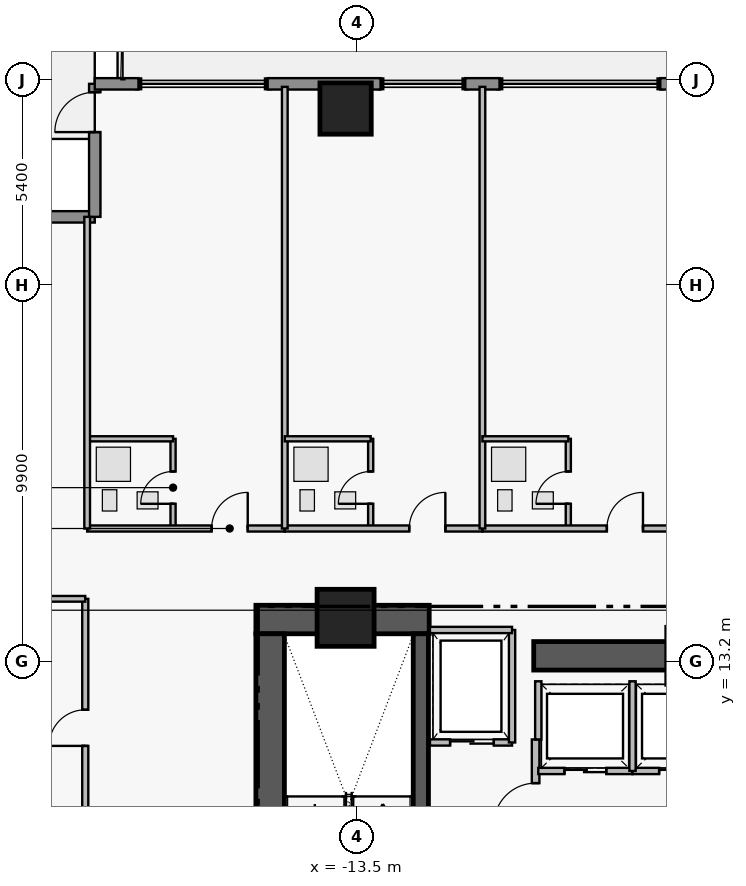
"""IFC4 building model, lengths in metres.
Left out: names, types, materials, properties, quantities, classifications, styles, units other than length and angle.
Written with IfcOpenShell. Run it as: python <this file> out.ifc"""

import sys

from ifc_helpers import new_model, si_unit, direction, frame, frame_2d, origin, origin_2d, place, context, subcontext, project, spatial, rectangle, extrude, element, fill, save


model = new_model("IFC4")
c1 = context("Model", 3, precision=1e-05, world=origin(), true_north=direction((0.0, 1.0)))
c2 = subcontext(c1, "Body", "Model", "MODEL_VIEW")
j1 = project(units=[si_unit("LENGTHUNIT", "METRE"), si_unit("PLANEANGLEUNIT", "RADIAN")], contexts=[c1])
p1 = place(None, origin())
s1 = spatial("IfcSite", under=j1, at=p1, CompositionType="ELEMENT")
p2 = place(p1, origin())
s2 = spatial("IfcBuilding", under=s1, at=p2, CompositionType="ELEMENT")
p3 = place(p2, frame((0.0, 0.0, 150.4)))
s3 = spatial("IfcBuildingStorey", under=s2, at=p3, CompositionType="ELEMENT", Elevation=150.4)
p4 = place(p3, frame((-16.16, 14.305, 0.0), z_axis=(0.0, 0.0, 1.0), x_axis=(1.0, 0.0, 0.0)))
e1 = element("IfcWall", 1, at=p4, inside=s3, PredefinedType="SHEAR", context=c2, shape_type="SweptSolid", body=[
    extrude(rectangle(XDim=4.56, YDim=0.75, at=frame_2d((2.28, 0.0))), origin(), (0.0, 0.0, 1.0), 3.46),
])
p5 = place(p3, frame((-15.785, 4.97, 0.0), z_axis=(0.0, 0.0, 1.0), x_axis=(0.0, 1.0, 0.0)))
e2 = element("IfcWall", 2, at=p5, inside=s3, PredefinedType="SHEAR", context=c2, shape_type="SweptSolid", body=[
    extrude(rectangle(XDim=8.96, YDim=0.75, at=frame_2d((4.48, 0.0))), origin(), (0.0, 0.0, 1.0), 3.46),
])
p6 = place(p3, frame((-8.85, 13.35, 0.0), z_axis=(0.0, 0.0, 1.0), x_axis=(1.0, 0.0, 0.0)))
e3 = element("IfcWall", 3, at=p6, inside=s3, PredefinedType="SHEAR", context=c2, shape_type="SweptSolid", body=[
    extrude(rectangle(XDim=7.6, YDim=0.75, at=frame_2d((3.8, 0.0))), origin(), (0.0, 0.0, 1.0), 3.43),
])
p7 = place(p3, frame((-11.82, 4.97, 0.0), z_axis=(0.0, 0.0, 1.0), x_axis=(0.0, 1.0, 0.0)))
e4 = element("IfcWall", 4, at=p7, inside=s3, PredefinedType="SHEAR", context=c2, shape_type="SweptSolid", body=[
    extrude(rectangle(XDim=8.96, YDim=0.4, at=frame_2d((4.48, 0.0))), origin(), (0.0, 0.0, 1.0), 3.46),
])
p8 = place(p7, frame((0.31, 0.0, 0.0)))
e5 = element("IfcOpeningElement", 5, at=p8, cuts=e4, PredefinedType="OPENING", context=c2, shape_type="SweptSolid", body=[
    extrude(rectangle(XDim=1.12, YDim=2.22, at=frame_2d((0.56, 1.11))), frame((0.0, 0.21, 0.0), z_axis=(0.0, -1.0, 0.0), x_axis=(1.0, 0.0, 0.0)), (0.0, 0.0, 1.0), 0.42),
])
p9 = place(p3, frame((-13.8, 14.35, 0.0), z_axis=(0.0, 0.0, 1.0), x_axis=(1.0, 0.0, 0.0)))
e6 = element("IfcColumn", 6, at=p9, inside=s3, PredefinedType="COLUMN", context=c2, shape_type="SweptSolid", body=[
    extrude(rectangle(XDim=1.5, YDim=1.5, at=origin_2d()), origin(), (0.0, 0.0, 1.0), 3.65),
])
p10 = place(p3, frame((-13.8, 27.75, 0.0), z_axis=(0.0, 0.0, 1.0), x_axis=(1.0, 0.0, 0.0)))
e7 = element("IfcColumn", 7, at=p10, inside=s3, PredefinedType="COLUMN", context=c2, shape_type="SweptSolid", body=[
    extrude(rectangle(XDim=1.35, YDim=1.35, at=origin_2d()), origin(), (0.0, 0.0, 1.0), 3.65),
])
p11 = place(p3, frame((-23.9, 24.9, 0.0), z_axis=(0.0, 0.0, 1.0), x_axis=(1.0, 0.0, 0.0)))
e8 = element("IfcWall", 8, at=p11, inside=s3, PredefinedType="STANDARD", context=c2, shape_type="SweptSolid", body=[
    extrude(rectangle(XDim=3.5, YDim=0.3, at=frame_2d((1.75, 0.0))), origin(), (0.0, 0.0, 1.0), 3.43),
])
p12 = place(p11, frame((1.065, 0.0, 1.25)))
e9 = element("IfcOpeningElement", 9, at=p12, cuts=e8, PredefinedType="OPENING", context=c2, shape_type="SweptSolid", body=[
    extrude(rectangle(XDim=1.15, YDim=1.55, at=frame_2d((0.575, 0.775))), frame((0.0, 0.16, 0.0), z_axis=(0.0, -1.0, 0.0), x_axis=(1.0, 0.0, 0.0)), (0.0, 0.0, 1.0), 0.32),
])
p13 = place(p3, frame((-20.4, 24.9, 0.0), z_axis=(0.0, 0.0, 1.0), x_axis=(0.0, 1.0, 0.0)))
e10 = element("IfcWall", 10, at=p13, inside=s3, PredefinedType="STANDARD", context=c2, shape_type="SweptSolid", body=[
    extrude(rectangle(XDim=3.5, YDim=0.3, at=frame_2d((1.75, 0.0))), origin(), (0.0, 0.0, 1.0), 3.43),
])
p14 = place(p13, frame((2.23, 0.0, 0.0)))
e11 = element("IfcOpeningElement", 11, at=p14, cuts=e10, PredefinedType="OPENING", context=c2, shape_type="SweptSolid", body=[
    extrude(rectangle(XDim=1.05, YDim=2.2, at=frame_2d((0.525, 1.1))), frame((0.0, 0.16, 0.0), z_axis=(0.0, -1.0, 0.0), x_axis=(1.0, 0.0, 0.0)), (0.0, 0.0, 1.0), 0.32),
])
p15 = place(p3, frame((-20.4, 28.4, 0.0), z_axis=(0.0, 0.0, 1.0), x_axis=(1.0, 0.0, 0.0)))
e12 = element("IfcWall", 12, at=p15, inside=s3, PredefinedType="STANDARD", context=c2, shape_type="SweptSolid", body=[
    extrude(rectangle(XDim=1.15, YDim=0.3, at=frame_2d((0.575, 0.0))), origin(), (0.0, 0.0, 1.0), 3.43),
])
p16 = place(p3, frame((-15.85, 28.4, 0.0), z_axis=(0.0, 0.0, 1.0), x_axis=(1.0, 0.0, 0.0)))
e13 = element("IfcWall", 13, at=p16, inside=s3, PredefinedType="STANDARD", context=c2, shape_type="SweptSolid", body=[
    extrude(rectangle(XDim=2.97, YDim=0.3, at=frame_2d((1.485, 0.0))), origin(), (0.0, 0.0, 1.0), 3.43),
])
p17 = place(p3, frame((-10.65, 28.4, 0.0), z_axis=(0.0, 0.0, 1.0), x_axis=(1.0, 0.0, 0.0)))
e14 = element("IfcWall", 14, at=p17, inside=s3, PredefinedType="STANDARD", context=c2, shape_type="SweptSolid", body=[
    extrude(rectangle(XDim=0.9, YDim=0.3, at=frame_2d((0.45, 0.0))), origin(), (0.0, 0.0, 1.0), 3.43),
])
p18 = place(p3, frame((-5.52, 28.4, 0.0), z_axis=(0.0, 0.0, 1.0), x_axis=(1.0, 0.0, 0.0)))
e15 = element("IfcWall", 15, at=p18, inside=s3, PredefinedType="STANDARD", context=c2, shape_type="SweptSolid", body=[
    extrude(rectangle(XDim=1.84, YDim=0.3, at=frame_2d((0.92, 0.0))), origin(), (0.0, 0.0, 1.0), 3.43),
])
p19 = place(p3, frame((-8.8, 5.05, 0.0), z_axis=(0.0, 0.0, 1.0), x_axis=(0.0, 1.0, 0.0)))
e16 = element("IfcWall", 16, at=p19, inside=s3, PredefinedType="PARTITIONING", context=c2, shape_type="SweptSolid", body=[
    extrude(rectangle(XDim=6.1, YDim=0.2, at=frame_2d((3.05, 0.0))), origin(), (0.0, 0.0, 1.0), 3.43),
])
p20 = place(p19, frame((0.25, 0.0, 0.0)))
e17 = element("IfcOpeningElement", 17, at=p20, cuts=e16, PredefinedType="OPENING", context=c2, shape_type="SweptSolid", body=[
    extrude(rectangle(XDim=1.1, YDim=2.2, at=frame_2d((0.55, 1.1))), frame((0.0, 0.11, 0.0), z_axis=(0.0, -1.0, 0.0), x_axis=(1.0, 0.0, 0.0)), (0.0, 0.0, 1.0), 0.22),
])
p21 = place(p19, frame((3.85, 0.0, 0.0)))
e18 = element("IfcOpeningElement", 18, at=p21, cuts=e16, PredefinedType="OPENING", context=c2, shape_type="SweptSolid", body=[
    extrude(rectangle(XDim=1.1, YDim=2.2, at=frame_2d((0.55, 1.1))), frame((0.0, 0.11, 0.0), z_axis=(0.0, -1.0, 0.0), x_axis=(1.0, 0.0, 0.0)), (0.0, 0.0, 1.0), 0.22),
])
p22 = place(p3, frame((-11.58, 11.07, 0.0), z_axis=(0.0, 0.0, 1.0), x_axis=(1.0, 0.0, 0.0)))
e19 = element("IfcWall", 19, at=p22, inside=s3, PredefinedType="PARTITIONING", context=c2, shape_type="SweptSolid", body=[
    extrude(rectangle(XDim=2.16, YDim=0.165, at=frame_2d((1.08, 0.0))), origin(), (0.0, 0.0, 1.0), 3.43),
])
p23 = place(p22, frame((0.53, 0.0, 0.0)))
e20 = element("IfcOpeningElement", 20, at=p23, cuts=e19, PredefinedType="OPENING", context=c2, shape_type="SweptSolid", body=[
    extrude(rectangle(XDim=1.15, YDim=2.25, at=frame_2d((0.575, 1.125))), frame((0.0, 0.093, 0.0), z_axis=(0.0, -1.0, 0.0), x_axis=(1.0, 0.0, 0.0)), (0.0, 0.0, 1.0), 0.185),
])
p24 = place(p3, frame((-8.73, 10.32, 0.0), z_axis=(0.0, 0.0, 1.0), x_axis=(1.0, 0.0, 0.0)))
e21 = element("IfcWall", 21, at=p24, inside=s3, PredefinedType="PARTITIONING", context=c2, shape_type="SweptSolid", body=[
    extrude(rectangle(XDim=2.48, YDim=0.165, at=frame_2d((1.24, 0.0))), origin(), (0.0, 0.0, 1.0), 3.43),
])
p25 = place(p24, frame((0.69, 0.0, 0.0)))
e22 = element("IfcOpeningElement", 22, at=p25, cuts=e21, PredefinedType="OPENING", context=c2, shape_type="SweptSolid", body=[
    extrude(rectangle(XDim=1.1, YDim=2.25, at=frame_2d((0.55, 1.125))), frame((0.0, 0.093, 0.0), z_axis=(0.0, -1.0, 0.0), x_axis=(1.0, 0.0, 0.0)), (0.0, 0.0, 1.0), 0.185),
])
p26 = place(p3, frame((-6.25, 10.32, 0.0), z_axis=(0.0, 0.0, 1.0), x_axis=(1.0, 0.0, 0.0)))
e23 = element("IfcWall", 23, at=p26, inside=s3, PredefinedType="PARTITIONING", context=c2, shape_type="SweptSolid", body=[
    extrude(rectangle(XDim=2.5, YDim=0.165, at=frame_2d((1.25, 0.0))), origin(), (0.0, 0.0, 1.0), 3.43),
])
p27 = place(p26, frame((0.7, 0.0, 0.0)))
e24 = element("IfcOpeningElement", 24, at=p27, cuts=e23, PredefinedType="OPENING", context=c2, shape_type="SweptSolid", body=[
    extrude(rectangle(XDim=1.1, YDim=2.25, at=frame_2d((0.55, 1.125))), frame((0.0, 0.093, 0.0), z_axis=(0.0, -1.0, 0.0), x_axis=(1.0, 0.0, 0.0)), (0.0, 0.0, 1.0), 0.185),
])
p28 = place(p3, frame((-18.34, 16.7, 0.0), z_axis=(0.0, 0.0, 1.0), x_axis=(0.0, 1.0, 0.0)))
e25 = element("IfcWall", 25, at=p28, inside=s3, PredefinedType="PLUMBINGWALL", context=c2, shape_type="SweptSolid", body=[
    extrude(rectangle(XDim=2.36, YDim=0.135, at=frame_2d((1.18, 0.0))), origin(), (0.0, 0.0, 1.0), 3.43),
])
p29 = place(p28, frame((0.65, 0.0, 0.0)))
e26 = element("IfcOpeningElement", 26, at=p29, cuts=e25, PredefinedType="OPENING", context=c2, shape_type="SweptSolid", body=[
    extrude(rectangle(XDim=0.85, YDim=2.1, at=frame_2d((0.425, 1.05))), frame((0.0, 0.077, 0.0), z_axis=(0.0, -1.0, 0.0), x_axis=(1.0, 0.0, 0.0)), (0.0, 0.0, 1.0), 0.155),
])
p30 = place(p3, frame((-20.6, 16.7, 0.0), z_axis=(0.0, 0.0, 1.0), x_axis=(1.0, 0.0, 0.0)))
e27 = element("IfcWall", 27, at=p30, inside=s3, PredefinedType="PARTITIONING", context=c2, shape_type="SweptSolid", body=[
    extrude(rectangle(XDim=5.2, YDim=0.16, at=frame_2d((2.6, 0.0))), origin(), (0.0, 0.0, 1.0), 3.43),
])
p31 = place(p30, frame((3.275, 0.0, 0.0)))
e28 = element("IfcOpeningElement", 28, at=p31, cuts=e27, PredefinedType="OPENING", context=c2, shape_type="SweptSolid", body=[
    extrude(rectangle(XDim=0.95, YDim=2.15, at=frame_2d((0.475, 1.075))), frame((0.0, 0.09, 0.0), z_axis=(0.0, -1.0, 0.0), x_axis=(1.0, 0.0, 0.0)), (0.0, 0.0, 1.0), 0.18),
])
p32 = place(p3, frame((-13.14, 16.7, 0.0), z_axis=(0.0, 0.0, 1.0), x_axis=(0.0, 1.0, 0.0)))
e29 = element("IfcWall", 29, at=p32, inside=s3, PredefinedType="PLUMBINGWALL", context=c2, shape_type="SweptSolid", body=[
    extrude(rectangle(XDim=2.36, YDim=0.135, at=frame_2d((1.18, 0.0))), origin(), (0.0, 0.0, 1.0), 3.43),
])
p33 = place(p32, frame((0.65, 0.0, 0.0)))
e30 = element("IfcOpeningElement", 30, at=p33, cuts=e29, PredefinedType="OPENING", context=c2, shape_type="SweptSolid", body=[
    extrude(rectangle(XDim=0.85, YDim=2.1, at=frame_2d((0.425, 1.05))), frame((0.0, 0.077, 0.0), z_axis=(0.0, -1.0, 0.0), x_axis=(1.0, 0.0, 0.0)), (0.0, 0.0, 1.0), 0.155),
])
p34 = place(p3, frame((-15.4, 16.7, 0.0), z_axis=(0.0, 0.0, 1.0), x_axis=(1.0, 0.0, 0.0)))
e31 = element("IfcWall", 31, at=p34, inside=s3, PredefinedType="PARTITIONING", context=c2, shape_type="SweptSolid", body=[
    extrude(rectangle(XDim=5.2, YDim=0.16, at=frame_2d((2.6, 0.0))), origin(), (0.0, 0.0, 1.0), 2.973),
])
p35 = place(p34, frame((3.275, 0.0, 0.0)))
e32 = element("IfcOpeningElement", 32, at=p35, cuts=e31, PredefinedType="OPENING", context=c2, shape_type="SweptSolid", body=[
    extrude(rectangle(XDim=0.95, YDim=2.15, at=frame_2d((0.475, 1.075))), frame((0.0, 0.09, 0.0), z_axis=(0.0, -1.0, 0.0), x_axis=(1.0, 0.0, 0.0)), (0.0, 0.0, 1.0), 0.18),
])
p36 = place(p3, frame((-7.94, 16.7, 0.0), z_axis=(0.0, 0.0, 1.0), x_axis=(0.0, 1.0, 0.0)))
e33 = element("IfcWall", 33, at=p36, inside=s3, PredefinedType="PLUMBINGWALL", context=c2, shape_type="SweptSolid", body=[
    extrude(rectangle(XDim=2.36, YDim=0.135, at=frame_2d((1.18, 0.0))), origin(), (0.0, 0.0, 1.0), 3.43),
])
p37 = place(p36, frame((0.65, 0.0, 0.0)))
e34 = element("IfcOpeningElement", 34, at=p37, cuts=e33, PredefinedType="OPENING", context=c2, shape_type="SweptSolid", body=[
    extrude(rectangle(XDim=0.85, YDim=2.1, at=frame_2d((0.425, 1.05))), frame((0.0, 0.077, 0.0), z_axis=(0.0, -1.0, 0.0), x_axis=(1.0, 0.0, 0.0)), (0.0, 0.0, 1.0), 0.155),
])
p38 = place(p3, frame((-10.2, 16.7, 0.0), z_axis=(0.0, 0.0, 1.0), x_axis=(1.0, 0.0, 0.0)))
e35 = element("IfcWall", 35, at=p38, inside=s3, PredefinedType="PARTITIONING", context=c2, shape_type="SweptSolid", body=[
    extrude(rectangle(XDim=5.2, YDim=0.16, at=frame_2d((2.6, 0.0))), origin(), (0.0, 0.0, 1.0), 2.973),
])
p39 = place(p38, frame((3.275, 0.0, 0.0)))
e36 = element("IfcOpeningElement", 36, at=p39, cuts=e35, PredefinedType="OPENING", context=c2, shape_type="SweptSolid", body=[
    extrude(rectangle(XDim=0.95, YDim=2.15, at=frame_2d((0.475, 1.075))), frame((0.0, 0.09, 0.0), z_axis=(0.0, -1.0, 0.0), x_axis=(1.0, 0.0, 0.0)), (0.0, 0.0, 1.0), 0.18),
])
p40 = place(p3, frame((-20.65, 8.06, 0.0), z_axis=(0.0, 0.0, 1.0), x_axis=(0.0, 1.0, 0.0)))
e37 = element("IfcWall", 37, at=p40, inside=s3, PredefinedType="PARTITIONING", context=c2, shape_type="SweptSolid", body=[
    extrude(rectangle(XDim=6.79, YDim=0.16, at=frame_2d((3.395, 0.0))), origin(), (0.0, 0.0, 1.0), 3.43),
])
p41 = place(p40, frame((2.92, 0.0, 0.0)))
e38 = element("IfcOpeningElement", 38, at=p41, cuts=e37, PredefinedType="OPENING", context=c2, shape_type="SweptSolid", body=[
    extrude(rectangle(XDim=0.95, YDim=2.15, at=frame_2d((0.475, 1.075))), frame((0.0, 0.09, 0.0), z_axis=(0.0, -1.0, 0.0), x_axis=(1.0, 0.0, 0.0)), (0.0, 0.0, 1.0), 0.18),
])
p42 = place(p3, frame((-9.42, 11.07, 0.0), z_axis=(0.0, 0.0, 1.0), x_axis=(0.0, 1.0, 0.0)))
e39 = element("IfcWall", 39, at=p42, inside=s3, PredefinedType="PARTITIONING", context=c2, shape_type="SweptSolid", body=[
    extrude(rectangle(XDim=2.96, YDim=0.165, at=frame_2d((1.48, 0.0))), origin(), (0.0, 0.0, 1.0), 3.43),
])
p43 = place(p3, frame((-11.58, 14.03, 0.0), z_axis=(0.0, 0.0, 1.0), x_axis=(1.0, 0.0, 0.0)))
e40 = element("IfcWall", 40, at=p43, inside=s3, PredefinedType="PARTITIONING", context=c2, shape_type="SweptSolid", body=[
    extrude(rectangle(XDim=2.16, YDim=0.165, at=frame_2d((1.08, 0.0))), origin(), (0.0, 0.0, 1.0), 3.43),
])
p44 = place(p3, frame((-8.73, 11.15, 0.0), z_axis=(0.0, 0.0, 1.0), x_axis=(0.0, 1.0, 0.0)))
e41 = element("IfcWall", 41, at=p44, inside=s3, PredefinedType="PARTITIONING", context=c2, shape_type="SweptSolid", body=[
    extrude(rectangle(XDim=1.53, YDim=0.165, at=frame_2d((0.765, 0.0))), origin(), (0.0, 0.0, 1.0), 3.43),
])
p45 = place(p3, frame((-6.25, 10.32, 0.0), z_axis=(0.0, 0.0, 1.0), x_axis=(0.0, 1.0, 0.0)))
e42 = element("IfcWall", 42, at=p45, inside=s3, PredefinedType="PARTITIONING", context=c2, shape_type="SweptSolid", body=[
    extrude(rectangle(XDim=2.36, YDim=0.165, at=frame_2d((1.18, 0.0))), origin(), (0.0, 0.0, 1.0), 3.43),
])
p46 = place(p3, frame((-20.6, 19.06, 0.0), z_axis=(0.0, 0.0, 1.0), x_axis=(1.0, 0.0, 0.0)))
e43 = element("IfcWall", 43, at=p46, inside=s3, PredefinedType="PLUMBINGWALL", context=c2, shape_type="SweptSolid", body=[
    extrude(rectangle(XDim=2.26, YDim=0.135, at=frame_2d((1.13, 0.0))), origin(), (0.0, 0.0, 1.0), 3.43),
])
p47 = place(p3, frame((-20.6, 16.7, 0.0), z_axis=(0.0, 0.0, 1.0), x_axis=(0.0, 1.0, 0.0)))
e44 = element("IfcWall", 44, at=p47, inside=s3, PredefinedType="PARTITIONING", context=c2, shape_type="SweptSolid", body=[
    extrude(rectangle(XDim=8.2, YDim=0.15, at=frame_2d((4.1, 0.0))), origin(), (0.0, 0.0, 1.0), 3.43),
])
p48 = place(p3, frame((-15.4, 16.7, 0.0), z_axis=(0.0, 0.0, 1.0), x_axis=(0.0, 1.0, 0.0)))
e45 = element("IfcWall", 45, at=p48, inside=s3, PredefinedType="PARTITIONING", context=c2, shape_type="SweptSolid", body=[
    extrude(rectangle(XDim=11.62, YDim=0.15, at=frame_2d((5.81, 0.0))), origin(), (0.0, 0.0, 1.0), 3.43),
])
p49 = place(p3, frame((-15.4, 19.06, 0.0), z_axis=(0.0, 0.0, 1.0), x_axis=(1.0, 0.0, 0.0)))
e46 = element("IfcWall", 46, at=p49, inside=s3, PredefinedType="PLUMBINGWALL", context=c2, shape_type="SweptSolid", body=[
    extrude(rectangle(XDim=2.26, YDim=0.135, at=frame_2d((1.13, 0.0))), origin(), (0.0, 0.0, 1.0), 2.973),
])
p50 = place(p3, frame((-10.2, 16.7, 0.0), z_axis=(0.0, 0.0, 1.0), x_axis=(0.0, 1.0, 0.0)))
e47 = element("IfcWall", 47, at=p50, inside=s3, PredefinedType="PARTITIONING", context=c2, shape_type="SweptSolid", body=[
    extrude(rectangle(XDim=11.62, YDim=0.15, at=frame_2d((5.81, 0.0))), origin(), (0.0, 0.0, 1.0), 3.43),
])
p51 = place(p3, frame((-10.2, 19.06, 0.0), z_axis=(0.0, 0.0, 1.0), x_axis=(1.0, 0.0, 0.0)))
e48 = element("IfcWall", 48, at=p51, inside=s3, PredefinedType="PLUMBINGWALL", context=c2, shape_type="SweptSolid", body=[
    extrude(rectangle(XDim=2.26, YDim=0.135, at=frame_2d((1.13, 0.0))), origin(), (0.0, 0.0, 1.0), 2.973),
])
p52 = place(p3, frame((-23.84, 14.85, 0.0), z_axis=(0.0, 0.0, 1.0), x_axis=(1.0, 0.0, 0.0)))
e49 = element("IfcWall", 49, at=p52, inside=s3, PredefinedType="PARTITIONING", context=c2, shape_type="SweptSolid", body=[
    extrude(rectangle(XDim=3.19, YDim=0.15, at=frame_2d((1.595, 0.0))), origin(), (0.0, 0.0, 1.0), 3.43),
])
p53 = place(p14, origin())
e50 = element("IfcDoor", 50, at=p53, inside=s3, OperationType="SINGLE_SWING_LEFT", PredefinedType="DOOR", context=c2, shape_type="SweptSolid", body=[
    extrude(rectangle(XDim=1.05, YDim=2.2, at=frame_2d((0.525, 1.1))), frame((0.0, 0.025, 0.0), z_axis=(0.0, -1.0, 0.0), x_axis=(1.0, 0.0, 0.0)), (0.0, 0.0, 1.0), 0.05),
])
fill(e11, e50)
p54 = place(p21, origin())
e51 = element("IfcDoor", 51, at=p54, inside=s3, OperationType="SINGLE_SWING_LEFT", PredefinedType="DOOR", context=c2, shape_type="SweptSolid", body=[
    extrude(rectangle(XDim=1.1, YDim=2.2, at=frame_2d((0.55, 1.1))), frame((0.0, 0.025, 0.0), z_axis=(0.0, -1.0, 0.0), x_axis=(1.0, 0.0, 0.0)), (0.0, 0.0, 1.0), 0.05),
])
fill(e18, e51)
p55 = place(p23, origin())
e52 = element("IfcDoor", 52, at=p55, inside=s3, OperationType="SLIDING_TO_LEFT", PredefinedType="DOOR", context=c2, shape_type="SweptSolid", body=[
    extrude(rectangle(XDim=1.15, YDim=2.25, at=frame_2d((0.575, 1.125))), frame((0.0, 0.025, 0.0), z_axis=(0.0, -1.0, 0.0), x_axis=(1.0, 0.0, 0.0)), (0.0, 0.0, 1.0), 0.05),
])
fill(e20, e52)
p56 = place(p25, origin())
e53 = element("IfcDoor", 53, at=p56, inside=s3, OperationType="SLIDING_TO_LEFT", PredefinedType="DOOR", context=c2, shape_type="SweptSolid", body=[
    extrude(rectangle(XDim=1.1, YDim=2.25, at=frame_2d((0.55, 1.125))), frame((0.0, 0.025, 0.0), z_axis=(0.0, -1.0, 0.0), x_axis=(1.0, 0.0, 0.0)), (0.0, 0.0, 1.0), 0.05),
])
fill(e22, e53)
p57 = place(p27, origin())
e54 = element("IfcDoor", 54, at=p57, inside=s3, OperationType="SLIDING_TO_LEFT", PredefinedType="DOOR", context=c2, shape_type="SweptSolid", body=[
    extrude(rectangle(XDim=1.1, YDim=2.25, at=frame_2d((0.55, 1.125))), frame((0.0, 0.025, 0.0), z_axis=(0.0, -1.0, 0.0), x_axis=(1.0, 0.0, 0.0)), (0.0, 0.0, 1.0), 0.05),
])
fill(e24, e54)
p58 = place(p29, origin())
e55 = element("IfcDoor", 55, at=p58, inside=s3, OperationType="SINGLE_SWING_LEFT", PredefinedType="DOOR", context=c2, shape_type="SweptSolid", body=[
    extrude(rectangle(XDim=0.85, YDim=2.1, at=frame_2d((0.425, 1.05))), frame((0.0, 0.025, 0.0), z_axis=(0.0, -1.0, 0.0), x_axis=(1.0, 0.0, 0.0)), (0.0, 0.0, 1.0), 0.05),
])
fill(e26, e55)
p59 = place(p31, origin())
e56 = element("IfcDoor", 56, at=p59, inside=s3, OperationType="SINGLE_SWING_RIGHT", PredefinedType="DOOR", context=c2, shape_type="SweptSolid", body=[
    extrude(rectangle(XDim=0.95, YDim=2.15, at=frame_2d((0.475, 1.075))), frame((0.0, 0.025, 0.0), z_axis=(0.0, -1.0, 0.0), x_axis=(1.0, 0.0, 0.0)), (0.0, 0.0, 1.0), 0.05),
])
fill(e28, e56)
p60 = place(p33, origin())
e57 = element("IfcDoor", 57, at=p60, inside=s3, OperationType="SINGLE_SWING_LEFT", PredefinedType="DOOR", context=c2, shape_type="SweptSolid", body=[
    extrude(rectangle(XDim=0.85, YDim=2.1, at=frame_2d((0.425, 1.05))), frame((0.0, 0.025, 0.0), z_axis=(0.0, -1.0, 0.0), x_axis=(1.0, 0.0, 0.0)), (0.0, 0.0, 1.0), 0.05),
])
fill(e30, e57)
p61 = place(p35, origin())
e58 = element("IfcDoor", 58, at=p61, inside=s3, OperationType="SINGLE_SWING_RIGHT", PredefinedType="DOOR", context=c2, shape_type="SweptSolid", body=[
    extrude(rectangle(XDim=0.95, YDim=2.15, at=frame_2d((0.475, 1.075))), frame((0.0, 0.025, 0.0), z_axis=(0.0, -1.0, 0.0), x_axis=(1.0, 0.0, 0.0)), (0.0, 0.0, 1.0), 0.05),
])
fill(e32, e58)
p62 = place(p37, origin())
e59 = element("IfcDoor", 59, at=p62, inside=s3, OperationType="SINGLE_SWING_LEFT", PredefinedType="DOOR", context=c2, shape_type="SweptSolid", body=[
    extrude(rectangle(XDim=0.85, YDim=2.1, at=frame_2d((0.425, 1.05))), frame((0.0, 0.025, 0.0), z_axis=(0.0, -1.0, 0.0), x_axis=(1.0, 0.0, 0.0)), (0.0, 0.0, 1.0), 0.05),
])
fill(e34, e59)
p63 = place(p39, origin())
e60 = element("IfcDoor", 60, at=p63, inside=s3, OperationType="SINGLE_SWING_RIGHT", PredefinedType="DOOR", context=c2, shape_type="SweptSolid", body=[
    extrude(rectangle(XDim=0.95, YDim=2.15, at=frame_2d((0.475, 1.075))), frame((0.0, 0.025, 0.0), z_axis=(0.0, -1.0, 0.0), x_axis=(1.0, 0.0, 0.0)), (0.0, 0.0, 1.0), 0.05),
])
fill(e36, e60)
p64 = place(p41, origin())
e61 = element("IfcDoor", 61, at=p64, inside=s3, OperationType="SINGLE_SWING_LEFT", PredefinedType="DOOR", context=c2, shape_type="SweptSolid", body=[
    extrude(rectangle(XDim=0.95, YDim=2.15, at=frame_2d((0.475, 1.075))), frame((0.0, 0.025, 0.0), z_axis=(0.0, -1.0, 0.0), x_axis=(1.0, 0.0, 0.0)), (0.0, 0.0, 1.0), 0.05),
])
fill(e38, e61)
save(model, sys.argv[1])
